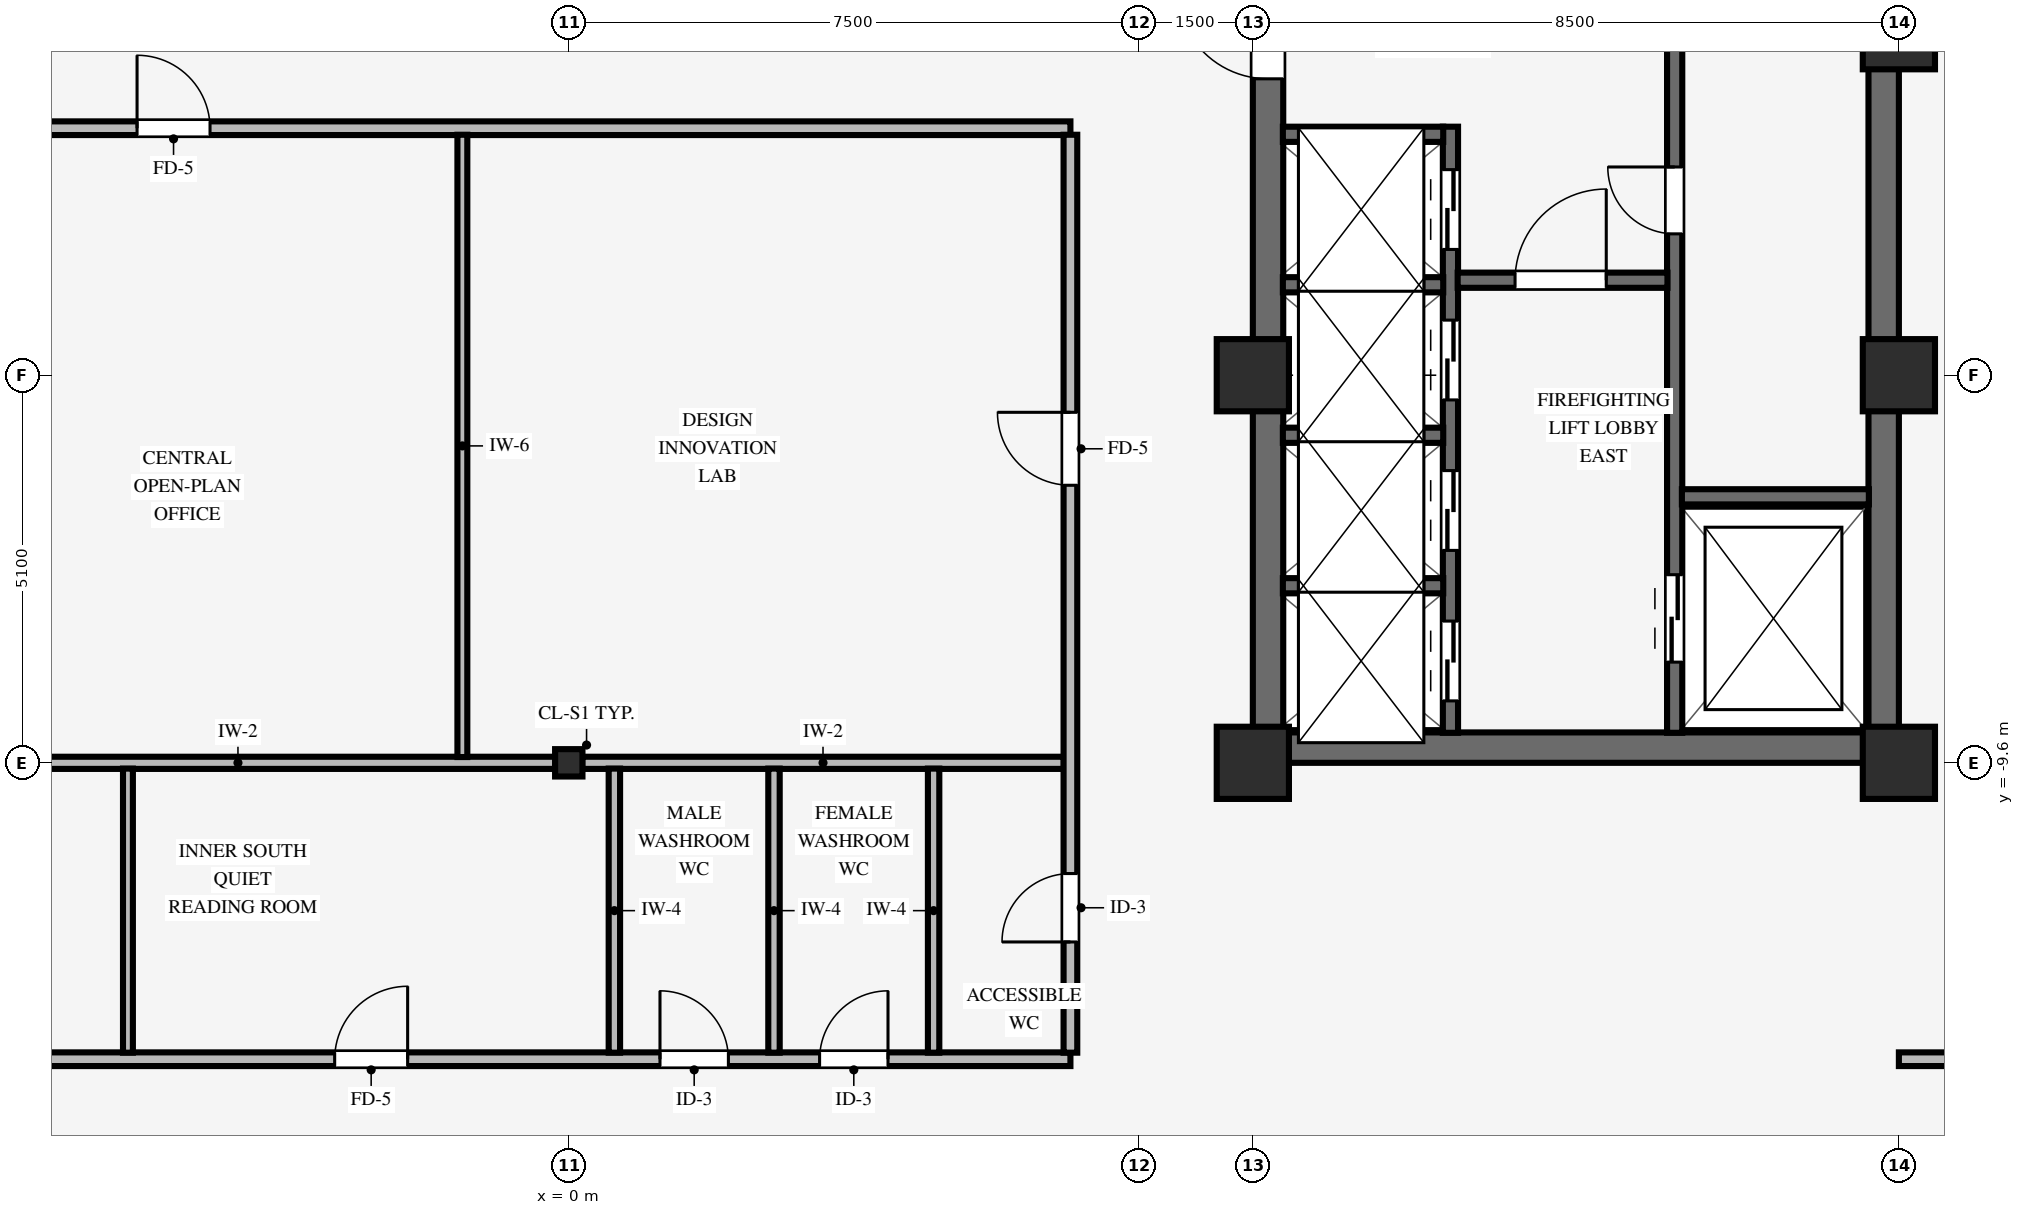
"""IFC4 building model, lengths in metres.
Left out: names, types, materials, properties, quantities, classifications, styles, units other than length and angle.
Written with IfcOpenShell. Run it as: python <this file> out.ifc"""

import sys

from ifc_helpers import new_model, si_unit, direction, frame, frame_2d, origin, origin_2d, place, context, subcontext, project, spatial, rectangle, i_section, extrude, source, transform, mapped, element, fill, save


model = new_model("IFC4")
c1 = context("Model", 3, precision=1e-05, world=origin(), true_north=direction((0.0, 1.0)))
c2 = subcontext(c1, "Body", "Model", "MODEL_VIEW")
j1 = project(units=[si_unit("LENGTHUNIT", "METRE"), si_unit("PLANEANGLEUNIT", "RADIAN")], contexts=[c1])
p1 = place(None, origin())
s1 = spatial("IfcSite", under=j1, at=p1, CompositionType="ELEMENT")
p2 = place(p1, origin())
s2 = spatial("IfcBuilding", under=s1, at=p2, CompositionType="ELEMENT")
p3 = place(p2, frame((0.0, 0.0, 153.05)))
s3 = spatial("IfcBuildingStorey", under=s2, at=p3, CompositionType="ELEMENT", Elevation=153.05)
p4 = place(p3, frame((9.0, -9.4, 0.0), z_axis=(0.0, 0.0, 1.0), x_axis=(1.0, 0.0, 0.0)))
e1 = element("IfcWall", 1, at=p4, inside=s3, PredefinedType="SHEAR", context=c2, shape_type="SweptSolid", body=[
    extrude(rectangle(XDim=8.5, YDim=0.4, at=frame_2d((4.25, 0.0))), origin(), (0.0, 0.0, 1.0), 3.37),
])
p5 = place(p3, frame((9.2, -9.205, 0.0), z_axis=(0.0, 0.0, 1.0), x_axis=(0.0, 1.0, 0.0)))
e2 = element("IfcWall", 2, at=p5, inside=s3, PredefinedType="SHEAR", context=c2, shape_type="SweptSolid", body=[
    extrude(rectangle(XDim=18.41, YDim=0.4, at=frame_2d((9.205, 0.0))), origin(), (0.0, 0.0, 1.0), 3.37),
])
p6 = place(p5, frame((8.605, 0.0, 0.0)))
e3 = element("IfcOpeningElement", 3, at=p6, cuts=e2, PredefinedType="OPENING", context=c2, shape_type="SweptSolid", body=[
    extrude(rectangle(XDim=1.2, YDim=2.15, at=frame_2d((0.6, 1.075))), frame((0.0, 0.21, 0.0), z_axis=(0.0, -1.0, 0.0), x_axis=(1.0, 0.0, 0.0)), (0.0, 0.0, 1.0), 0.42),
])
p7 = place(p3, frame((17.3, -9.205, 0.0), z_axis=(0.0, 0.0, 1.0), x_axis=(0.0, 1.0, 0.0)))
e4 = element("IfcWall", 4, at=p7, inside=s3, PredefinedType="SHEAR", context=c2, shape_type="SweptSolid", body=[
    extrude(rectangle(XDim=18.41, YDim=0.4, at=frame_2d((9.205, 0.0))), origin(), (0.0, 0.0, 1.0), 3.37),
])
for number, where, z_axis, x_axis in (
    (5, (9.0, -9.6, 0.0), (0.0, 0.0, 1.0), (1.0, 0.0, 0.0)),
    (6, (9.0, -4.5, 0.0), (0.0, 0.0, 1.0), (1.0, 0.0, 0.0)),
    (7, (17.5, -9.6, 0.0), (0.0, 0.0, 1.0), (1.0, 0.0, 0.0)),
    (8, (17.5, -4.5, 0.0), (0.0, 0.0, 1.0), (1.0, 0.0, 0.0)),
    (9, (17.5, 0.0, 0.0), (0.0, 0.0, 1.0), (1.0, 0.0, 0.0)),
):
    element("IfcColumn", number, at=place(p3, frame(where, z_axis=z_axis, x_axis=x_axis)), inside=s3, PredefinedType="COLUMN", context=c2, shape_type="SweptSolid", body=[
        extrude(rectangle(XDim=0.95, YDim=0.95, at=origin_2d()), origin(), (0.0, 0.0, 1.0), 3.37),
    ])
p8 = place(p3, frame((0.0, -9.6, 0.0), z_axis=(0.0, 0.0, 1.0), x_axis=(1.0, 0.0, 0.0)))
e10 = element("IfcColumn", 10, at=p8, inside=s3, PredefinedType="COLUMN", context=c2, shape_type="SweptSolid", body=[
    extrude(i_section(OverallWidth=0.36, OverallDepth=0.36, WebThickness=0.021, FlangeThickness=0.021, FilletRadius=0.018, at=origin_2d()), origin(), (0.0, 0.0, 1.0), 3.37),
])
p9 = place(p3, frame((14.55, -9.205, 0.0), z_axis=(0.0, 0.0, 1.0), x_axis=(0.0, 1.0, 0.0)))
e11 = element("IfcWall", 11, at=p9, inside=s3, PredefinedType="SHEAR", context=c2, shape_type="SweptSolid", body=[
    extrude(rectangle(XDim=10.11, YDim=0.2, at=frame_2d((5.055, 0.0))), origin(), (0.0, 0.0, 1.0), 3.37),
])
p10 = place(p9, frame((6.565, 0.0, 0.0)))
e12 = element("IfcOpeningElement", 12, at=p10, cuts=e11, PredefinedType="OPENING", context=c2, shape_type="SweptSolid", body=[
    extrude(rectangle(XDim=0.88, YDim=2.1, at=frame_2d((0.44, 1.05))), frame((0.0, 0.11, 0.0), z_axis=(0.0, -1.0, 0.0), x_axis=(1.0, 0.0, 0.0)), (0.0, 0.0, 1.0), 0.22),
])
p11 = place(p9, frame((0.93, 0.0, 0.0)))
e13 = element("IfcOpeningElement", 13, at=p11, cuts=e11, PredefinedType="OPENING", context=c2, shape_type="SweptSolid", body=[
    extrude(rectangle(XDim=1.15, YDim=2.15, at=frame_2d((0.575, 1.075))), frame((0.0, 0.11, 0.0), z_axis=(0.0, -1.0, 0.0), x_axis=(1.0, 0.0, 0.0)), (0.0, 0.0, 1.0), 0.22),
])
p12 = place(p3, frame((14.645, -6.1, 0.0), z_axis=(0.0, 0.0, 1.0), x_axis=(1.0, 0.0, 0.0)))
e14 = element("IfcWall", 14, at=p12, inside=s3, PredefinedType="SHEAR", context=c2, shape_type="SweptSolid", body=[
    extrude(rectangle(XDim=2.46, YDim=0.2, at=frame_2d((1.23, 0.0))), origin(), (0.0, 0.0, 1.0), 3.37),
])
p13 = place(p3, frame((11.6, -9.205, 0.0), z_axis=(0.0, 0.0, 1.0), x_axis=(0.0, 1.0, 0.0)))
e15 = element("IfcWall", 15, at=p13, inside=s3, PredefinedType="SHEAR", context=c2, shape_type="SweptSolid", body=[
    extrude(rectangle(XDim=7.975, YDim=0.2, at=frame_2d((3.988, 0.0))), origin(), (0.0, 0.0, 1.0), 3.37),
])
p14 = place(p13, frame((0.42, 0.0, 0.0)))
e16 = element("IfcOpeningElement", 16, at=p14, cuts=e15, PredefinedType="OPENING", context=c2, shape_type="SweptSolid", body=[
    extrude(rectangle(XDim=1.05, YDim=2.15, at=frame_2d((0.525, 1.075))), frame((0.0, 0.11, 0.0), z_axis=(0.0, -1.0, 0.0), x_axis=(1.0, 0.0, 0.0)), (0.0, 0.0, 1.0), 0.22),
])
p15 = place(p13, frame((2.4, 0.0, 0.0)))
e17 = element("IfcOpeningElement", 17, at=p15, cuts=e15, PredefinedType="OPENING", context=c2, shape_type="SweptSolid", body=[
    extrude(rectangle(XDim=1.05, YDim=2.15, at=frame_2d((0.525, 1.075))), frame((0.0, 0.11, 0.0), z_axis=(0.0, -1.0, 0.0), x_axis=(1.0, 0.0, 0.0)), (0.0, 0.0, 1.0), 0.22),
])
p16 = place(p13, frame((4.38, 0.0, 0.0)))
e18 = element("IfcOpeningElement", 18, at=p16, cuts=e15, PredefinedType="OPENING", context=c2, shape_type="SweptSolid", body=[
    extrude(rectangle(XDim=1.05, YDim=2.15, at=frame_2d((0.525, 1.075))), frame((0.0, 0.11, 0.0), z_axis=(0.0, -1.0, 0.0), x_axis=(1.0, 0.0, 0.0)), (0.0, 0.0, 1.0), 0.22),
])
p17 = place(p13, frame((6.36, 0.0, 0.0)))
e19 = element("IfcOpeningElement", 19, at=p17, cuts=e15, PredefinedType="OPENING", context=c2, shape_type="SweptSolid", body=[
    extrude(rectangle(XDim=1.05, YDim=2.15, at=frame_2d((0.525, 1.075))), frame((0.0, 0.11, 0.0), z_axis=(0.0, -1.0, 0.0), x_axis=(1.0, 0.0, 0.0)), (0.0, 0.0, 1.0), 0.22),
])
p18 = place(p3, frame((11.695, -3.25, 0.0), z_axis=(0.0, 0.0, 1.0), x_axis=(1.0, 0.0, 0.0)))
e20 = element("IfcWall", 20, at=p18, inside=s3, PredefinedType="SHEAR", context=c2, shape_type="SweptSolid", body=[
    extrude(rectangle(XDim=2.76, YDim=0.2, at=frame_2d((1.38, 0.0))), origin(), (0.0, 0.0, 1.0), 3.37),
])
p19 = place(p18, frame((0.755, 0.0, 0.0)))
e21 = element("IfcOpeningElement", 21, at=p19, cuts=e20, PredefinedType="OPENING", context=c2, shape_type="SweptSolid", body=[
    extrude(rectangle(XDim=1.2, YDim=2.15, at=frame_2d((0.6, 1.075))), frame((0.0, 0.11, 0.0), z_axis=(0.0, -1.0, 0.0), x_axis=(1.0, 0.0, 0.0)), (0.0, 0.0, 1.0), 0.22),
])
for number, where, z_axis, x_axis in (
    (22, (9.395, -7.27, 0.0), (0.0, 0.0, 1.0), (1.0, 0.0, 0.0)),
    (23, (9.395, -5.29, 0.0), (0.0, 0.0, 1.0), (1.0, 0.0, 0.0)),
    (24, (9.395, -3.31, 0.0), (0.0, 0.0, 1.0), (1.0, 0.0, 0.0)),
    (25, (9.395, -1.33, 0.0), (0.0, 0.0, 1.0), (1.0, 0.0, 0.0)),
):
    element("IfcWall", number, at=place(p3, frame(where, z_axis=z_axis, x_axis=x_axis)), inside=s3, PredefinedType="SHEAR", context=c2, shape_type="SweptSolid", body=[
        extrude(rectangle(XDim=2.11, YDim=0.2, at=frame_2d((1.055, 0.0))), origin(), (0.0, 0.0, 1.0), 3.37),
    ])
p20 = place(p3, frame((-17.7, -13.5, 0.0), z_axis=(0.0, 0.0, 1.0), x_axis=(1.0, 0.0, 0.0)))
e26 = element("IfcWall", 26, at=p20, inside=s3, PredefinedType="PARTITIONING", context=c2, shape_type="SweptSolid", body=[
    extrude(rectangle(XDim=24.3, YDim=0.18, at=frame_2d((12.15, 0.0))), origin(), (0.0, 0.0, 1.0), 2.998),
])
p21 = place(p20, frame((5.47, 0.0, 0.0)))
e27 = element("IfcOpeningElement", 27, at=p21, cuts=e26, PredefinedType="OPENING", context=c2, shape_type="SweptSolid", body=[
    extrude(rectangle(XDim=0.96, YDim=2.1, at=frame_2d((0.48, 1.05))), frame((0.0, 0.1, 0.0), z_axis=(0.0, -1.0, 0.0), x_axis=(1.0, 0.0, 0.0)), (0.0, 0.0, 1.0), 0.2),
])
p22 = place(p20, frame((14.62, 0.0, 0.0)))
e28 = element("IfcOpeningElement", 28, at=p22, cuts=e26, PredefinedType="OPENING", context=c2, shape_type="SweptSolid", body=[
    extrude(rectangle(XDim=0.96, YDim=2.1, at=frame_2d((0.48, 1.05))), frame((0.0, 0.1, 0.0), z_axis=(0.0, -1.0, 0.0), x_axis=(1.0, 0.0, 0.0)), (0.0, 0.0, 1.0), 0.2),
])
p23 = place(p20, frame((18.9, 0.0, 0.0)))
e29 = element("IfcOpeningElement", 29, at=p23, cuts=e26, PredefinedType="OPENING", context=c2, shape_type="SweptSolid", body=[
    extrude(rectangle(XDim=0.9, YDim=2.1, at=frame_2d((0.45, 1.05))), frame((0.0, 0.1, 0.0), z_axis=(0.0, -1.0, 0.0), x_axis=(1.0, 0.0, 0.0)), (0.0, 0.0, 1.0), 0.2),
])
p24 = place(p20, frame((21.0, 0.0, 0.0)))
e30 = element("IfcOpeningElement", 30, at=p24, cuts=e26, PredefinedType="OPENING", context=c2, shape_type="SweptSolid", body=[
    extrude(rectangle(XDim=0.9, YDim=2.1, at=frame_2d((0.45, 1.05))), frame((0.0, 0.1, 0.0), z_axis=(0.0, -1.0, 0.0), x_axis=(1.0, 0.0, 0.0)), (0.0, 0.0, 1.0), 0.2),
])
p25 = place(p3, frame((17.5, -13.5, 0.0), z_axis=(0.0, 0.0, 1.0), x_axis=(1.0, 0.0, 0.0)))
e31 = element("IfcWall", 31, at=p25, inside=s3, PredefinedType="PARTITIONING", context=c2, shape_type="SweptSolid", body=[
    extrude(rectangle(XDim=3.3, YDim=0.18, at=frame_2d((1.65, 0.0))), origin(), (0.0, 0.0, 1.0), 2.998),
])
p26 = place(p3, frame((-8.529, -9.6, 0.0), z_axis=(0.0, 0.0, 1.0), x_axis=(1.0, 0.0, 0.0)))
e32 = element("IfcWall", 32, at=p26, inside=s3, PredefinedType="PARTITIONING", context=c2, shape_type="SweptSolid", body=[
    extrude(rectangle(XDim=8.353, YDim=0.16, at=frame_2d((4.177, 0.0))), origin(), (0.0, 0.0, 1.0), 2.405),
])
p27 = place(p3, frame((0.176, -9.6, 0.0), z_axis=(0.0, 0.0, 1.0), x_axis=(1.0, 0.0, 0.0)))
e33 = element("IfcWall", 33, at=p27, inside=s3, PredefinedType="PARTITIONING", context=c2, shape_type="SweptSolid", body=[
    extrude(rectangle(XDim=6.338, YDim=0.16, at=frame_2d((3.169, 0.0))), origin(), (0.0, 0.0, 1.0), 2.405),
])
p28 = place(p3, frame((-9.0, -1.25, 0.0), z_axis=(0.0, 0.0, 1.0), x_axis=(1.0, 0.0, 0.0)))
e34 = element("IfcWall", 34, at=p28, inside=s3, PredefinedType="PARTITIONING", context=c2, shape_type="SweptSolid", body=[
    extrude(rectangle(XDim=15.6, YDim=0.18, at=frame_2d((7.8, 0.0))), origin(), (0.0, 0.0, 1.0), 3.36),
])
p29 = place(p28, frame((3.32, 0.0, 0.0)))
e35 = element("IfcOpeningElement", 35, at=p29, cuts=e34, PredefinedType="OPENING", context=c2, shape_type="SweptSolid", body=[
    extrude(rectangle(XDim=0.96, YDim=2.1, at=frame_2d((0.48, 1.05))), frame((0.0, 0.1, 0.0), z_axis=(0.0, -1.0, 0.0), x_axis=(1.0, 0.0, 0.0)), (0.0, 0.0, 1.0), 0.2),
])
p30 = place(p3, frame((-5.8, -13.414, 0.0), z_axis=(0.0, 0.0, 1.0), x_axis=(0.0, 1.0, 0.0)))
e36 = element("IfcWall", 36, at=p30, inside=s3, PredefinedType="PARTITIONING", context=c2, shape_type="SweptSolid", body=[
    extrude(rectangle(XDim=3.738, YDim=0.13, at=frame_2d((1.869, 0.0))), origin(), (0.0, 0.0, 1.0), 3.36),
])
p31 = place(p3, frame((-1.4, -9.524, 0.0), z_axis=(0.0, 0.0, 1.0), x_axis=(0.0, 1.0, 0.0)))
e37 = element("IfcWall", 37, at=p31, inside=s3, PredefinedType="PARTITIONING", context=c2, shape_type="SweptSolid", body=[
    extrude(rectangle(XDim=8.188, YDim=0.13, at=frame_2d((4.094, 0.0))), origin(), (0.0, 0.0, 1.0), 3.36),
])
for number, where, z_axis, x_axis in (
    (38, (0.6, -13.414, 0.0), (0.0, 0.0, 1.0), (0.0, 1.0, 0.0)),
    (39, (2.7, -13.414, 0.0), (0.0, 0.0, 1.0), (0.0, 1.0, 0.0)),
    (40, (4.8, -13.414, 0.0), (0.0, 0.0, 1.0), (0.0, 1.0, 0.0)),
):
    element("IfcWall", number, at=place(p3, frame(where, z_axis=z_axis, x_axis=x_axis)), inside=s3, PredefinedType="PARTITIONING", context=c2, shape_type="SweptSolid", body=[
        extrude(rectangle(XDim=3.738, YDim=0.15, at=frame_2d((1.869, 0.0))), origin(), (0.0, 0.0, 1.0), 3.36),
    ])
p32 = place(p3, frame((6.6, -13.414, 0.0), z_axis=(0.0, 0.0, 1.0), x_axis=(0.0, 1.0, 0.0)))
e41 = element("IfcWall", 41, at=p32, inside=s3, PredefinedType="PARTITIONING", context=c2, shape_type="SweptSolid", body=[
    extrude(rectangle(XDim=12.078, YDim=0.18, at=frame_2d((6.039, 0.0))), origin(), (0.0, 0.0, 1.0), 3.36),
])
p33 = place(p32, frame((7.466, 0.0, 0.0)))
e42 = element("IfcOpeningElement", 42, at=p33, cuts=e41, PredefinedType="OPENING", context=c2, shape_type="SweptSolid", body=[
    extrude(rectangle(XDim=0.96, YDim=2.1, at=frame_2d((0.48, 1.05))), frame((0.0, 0.1, 0.0), z_axis=(0.0, -1.0, 0.0), x_axis=(1.0, 0.0, 0.0)), (0.0, 0.0, 1.0), 0.2),
])
p34 = place(p32, frame((1.457, 0.0, 0.0)))
e43 = element("IfcOpeningElement", 43, at=p34, cuts=e41, PredefinedType="OPENING", context=c2, shape_type="SweptSolid", body=[
    extrude(rectangle(XDim=0.9, YDim=2.1, at=frame_2d((0.45, 1.05))), frame((0.0, 0.1, 0.0), z_axis=(0.0, -1.0, 0.0), x_axis=(1.0, 0.0, 0.0)), (0.0, 0.0, 1.0), 0.2),
])
m1 = source(origin(), c2, "Body", "SweptSolid", [
    extrude(rectangle(XDim=0.88, YDim=2.1, at=frame_2d((0.44, 1.05))), frame((0.0, 0.025, 0.0), z_axis=(0.0, -1.0, 0.0), x_axis=(1.0, 0.0, 0.0)), (0.0, 0.0, 1.0), 0.05),
])
p35 = place(p10, origin())
e44 = element("IfcDoor", 44, at=p35, inside=s3, OperationType="SINGLE_SWING_RIGHT", PredefinedType="DOOR", context=c2, shape_type="MappedRepresentation", body=[
    mapped(m1, transform((0.0, 0.0, 0.0), scale=1.0)),
])
fill(e12, e44)
m2 = source(origin(), c2, "Body", "SweptSolid", [
    extrude(rectangle(XDim=1.2, YDim=2.15, at=frame_2d((0.6, 1.075))), frame((0.0, 0.025, 0.0), z_axis=(0.0, -1.0, 0.0), x_axis=(1.0, 0.0, 0.0)), (0.0, 0.0, 1.0), 0.05),
])
p36 = place(p19, origin())
e45 = element("IfcDoor", 45, at=p36, inside=s3, OperationType="SINGLE_SWING_RIGHT", PredefinedType="DOOR", context=c2, shape_type="MappedRepresentation", body=[
    mapped(m2, transform((0.0, 0.0, 0.0), scale=1.0)),
])
fill(e21, e45)
p37 = place(p6, origin())
e46 = element("IfcDoor", 46, at=p37, inside=s3, OperationType="SINGLE_SWING_RIGHT", PredefinedType="DOOR", context=c2, shape_type="MappedRepresentation", body=[
    mapped(m2, transform((0.0, 0.0, 0.0), scale=1.0)),
])
fill(e3, e46)
m3 = source(origin(), c2, "Body", "SweptSolid", [
    extrude(rectangle(XDim=1.15, YDim=2.15, at=frame_2d((0.575, 1.075))), frame((0.0, 0.025, 0.0), z_axis=(0.0, -1.0, 0.0), x_axis=(1.0, 0.0, 0.0)), (0.0, 0.0, 1.0), 0.05),
])
p38 = place(p11, origin())
e47 = element("IfcDoor", 47, at=p38, inside=s3, OperationType="DOUBLE_DOOR_SLIDING", PredefinedType="DOOR", context=c2, shape_type="MappedRepresentation", body=[
    mapped(m3, transform((0.0, 0.0, 0.0), scale=1.0)),
])
fill(e13, e47)
m4 = source(origin(), c2, "Body", "SweptSolid", [
    extrude(rectangle(XDim=1.05, YDim=2.15, at=frame_2d((0.525, 1.075))), frame((0.0, 0.025, 0.0), z_axis=(0.0, -1.0, 0.0), x_axis=(1.0, 0.0, 0.0)), (0.0, 0.0, 1.0), 0.05),
])
p39 = place(p14, origin())
e48 = element("IfcDoor", 48, at=p39, inside=s3, OperationType="DOUBLE_DOOR_SLIDING", PredefinedType="DOOR", context=c2, shape_type="MappedRepresentation", body=[
    mapped(m4, transform((0.0, 0.0, 0.0), scale=1.0)),
])
fill(e16, e48)
p40 = place(p15, origin())
e49 = element("IfcDoor", 49, at=p40, inside=s3, OperationType="DOUBLE_DOOR_SLIDING", PredefinedType="DOOR", context=c2, shape_type="MappedRepresentation", body=[
    mapped(m4, transform((0.0, 0.0, 0.0), scale=1.0)),
])
fill(e17, e49)
p41 = place(p16, origin())
e50 = element("IfcDoor", 50, at=p41, inside=s3, OperationType="DOUBLE_DOOR_SLIDING", PredefinedType="DOOR", context=c2, shape_type="MappedRepresentation", body=[
    mapped(m4, transform((0.0, 0.0, 0.0), scale=1.0)),
])
fill(e18, e50)
p42 = place(p17, origin())
e51 = element("IfcDoor", 51, at=p42, inside=s3, OperationType="DOUBLE_DOOR_SLIDING", PredefinedType="DOOR", context=c2, shape_type="MappedRepresentation", body=[
    mapped(m4, transform((0.0, 0.0, 0.0), scale=1.0)),
])
fill(e19, e51)
m5 = source(origin(), c2, "Body", "SweptSolid", [
    extrude(rectangle(XDim=0.96, YDim=2.1, at=frame_2d((0.48, 1.05))), frame((0.0, 0.025, 0.0), z_axis=(0.0, -1.0, 0.0), x_axis=(1.0, 0.0, 0.0)), (0.0, 0.0, 1.0), 0.05),
])
p43 = place(p33, origin())
e52 = element("IfcDoor", 52, at=p43, inside=s3, OperationType="SINGLE_SWING_RIGHT", PredefinedType="DOOR", context=c2, shape_type="MappedRepresentation", body=[
    mapped(m5, transform((0.0, 0.0, 0.0), scale=1.0)),
])
fill(e42, e52)
p44 = place(p29, origin())
e53 = element("IfcDoor", 53, at=p44, inside=s3, OperationType="SINGLE_SWING_LEFT", PredefinedType="DOOR", context=c2, shape_type="MappedRepresentation", body=[
    mapped(m5, transform((0.0, 0.0, 0.0), scale=1.0)),
])
fill(e35, e53)
p45 = place(p22, origin())
e54 = element("IfcDoor", 54, at=p45, inside=s3, OperationType="SINGLE_SWING_RIGHT", PredefinedType="DOOR", context=c2, shape_type="MappedRepresentation", body=[
    mapped(m5, transform((0.0, 0.0, 0.0), scale=1.0)),
])
fill(e28, e54)
m6 = source(origin(), c2, "Body", "SweptSolid", [
    extrude(rectangle(XDim=0.9, YDim=2.1, at=frame_2d((0.45, 1.05))), frame((0.0, 0.025, 0.0), z_axis=(0.0, -1.0, 0.0), x_axis=(1.0, 0.0, 0.0)), (0.0, 0.0, 1.0), 0.05),
])
p46 = place(p34, origin())
e55 = element("IfcDoor", 55, at=p46, inside=s3, OperationType="SINGLE_SWING_LEFT", PredefinedType="DOOR", context=c2, shape_type="MappedRepresentation", body=[
    mapped(m6, transform((0.0, 0.0, 0.0), scale=1.0)),
])
fill(e43, e55)
p47 = place(p23, origin())
e56 = element("IfcDoor", 56, at=p47, inside=s3, OperationType="SINGLE_SWING_LEFT", PredefinedType="DOOR", context=c2, shape_type="MappedRepresentation", body=[
    mapped(m6, transform((0.0, 0.0, 0.0), scale=1.0)),
])
fill(e29, e56)
p48 = place(p24, origin())
e57 = element("IfcDoor", 57, at=p48, inside=s3, OperationType="SINGLE_SWING_RIGHT", PredefinedType="DOOR", context=c2, shape_type="MappedRepresentation", body=[
    mapped(m6, transform((0.0, 0.0, 0.0), scale=1.0)),
])
fill(e30, e57)
save(model, sys.argv[1])
